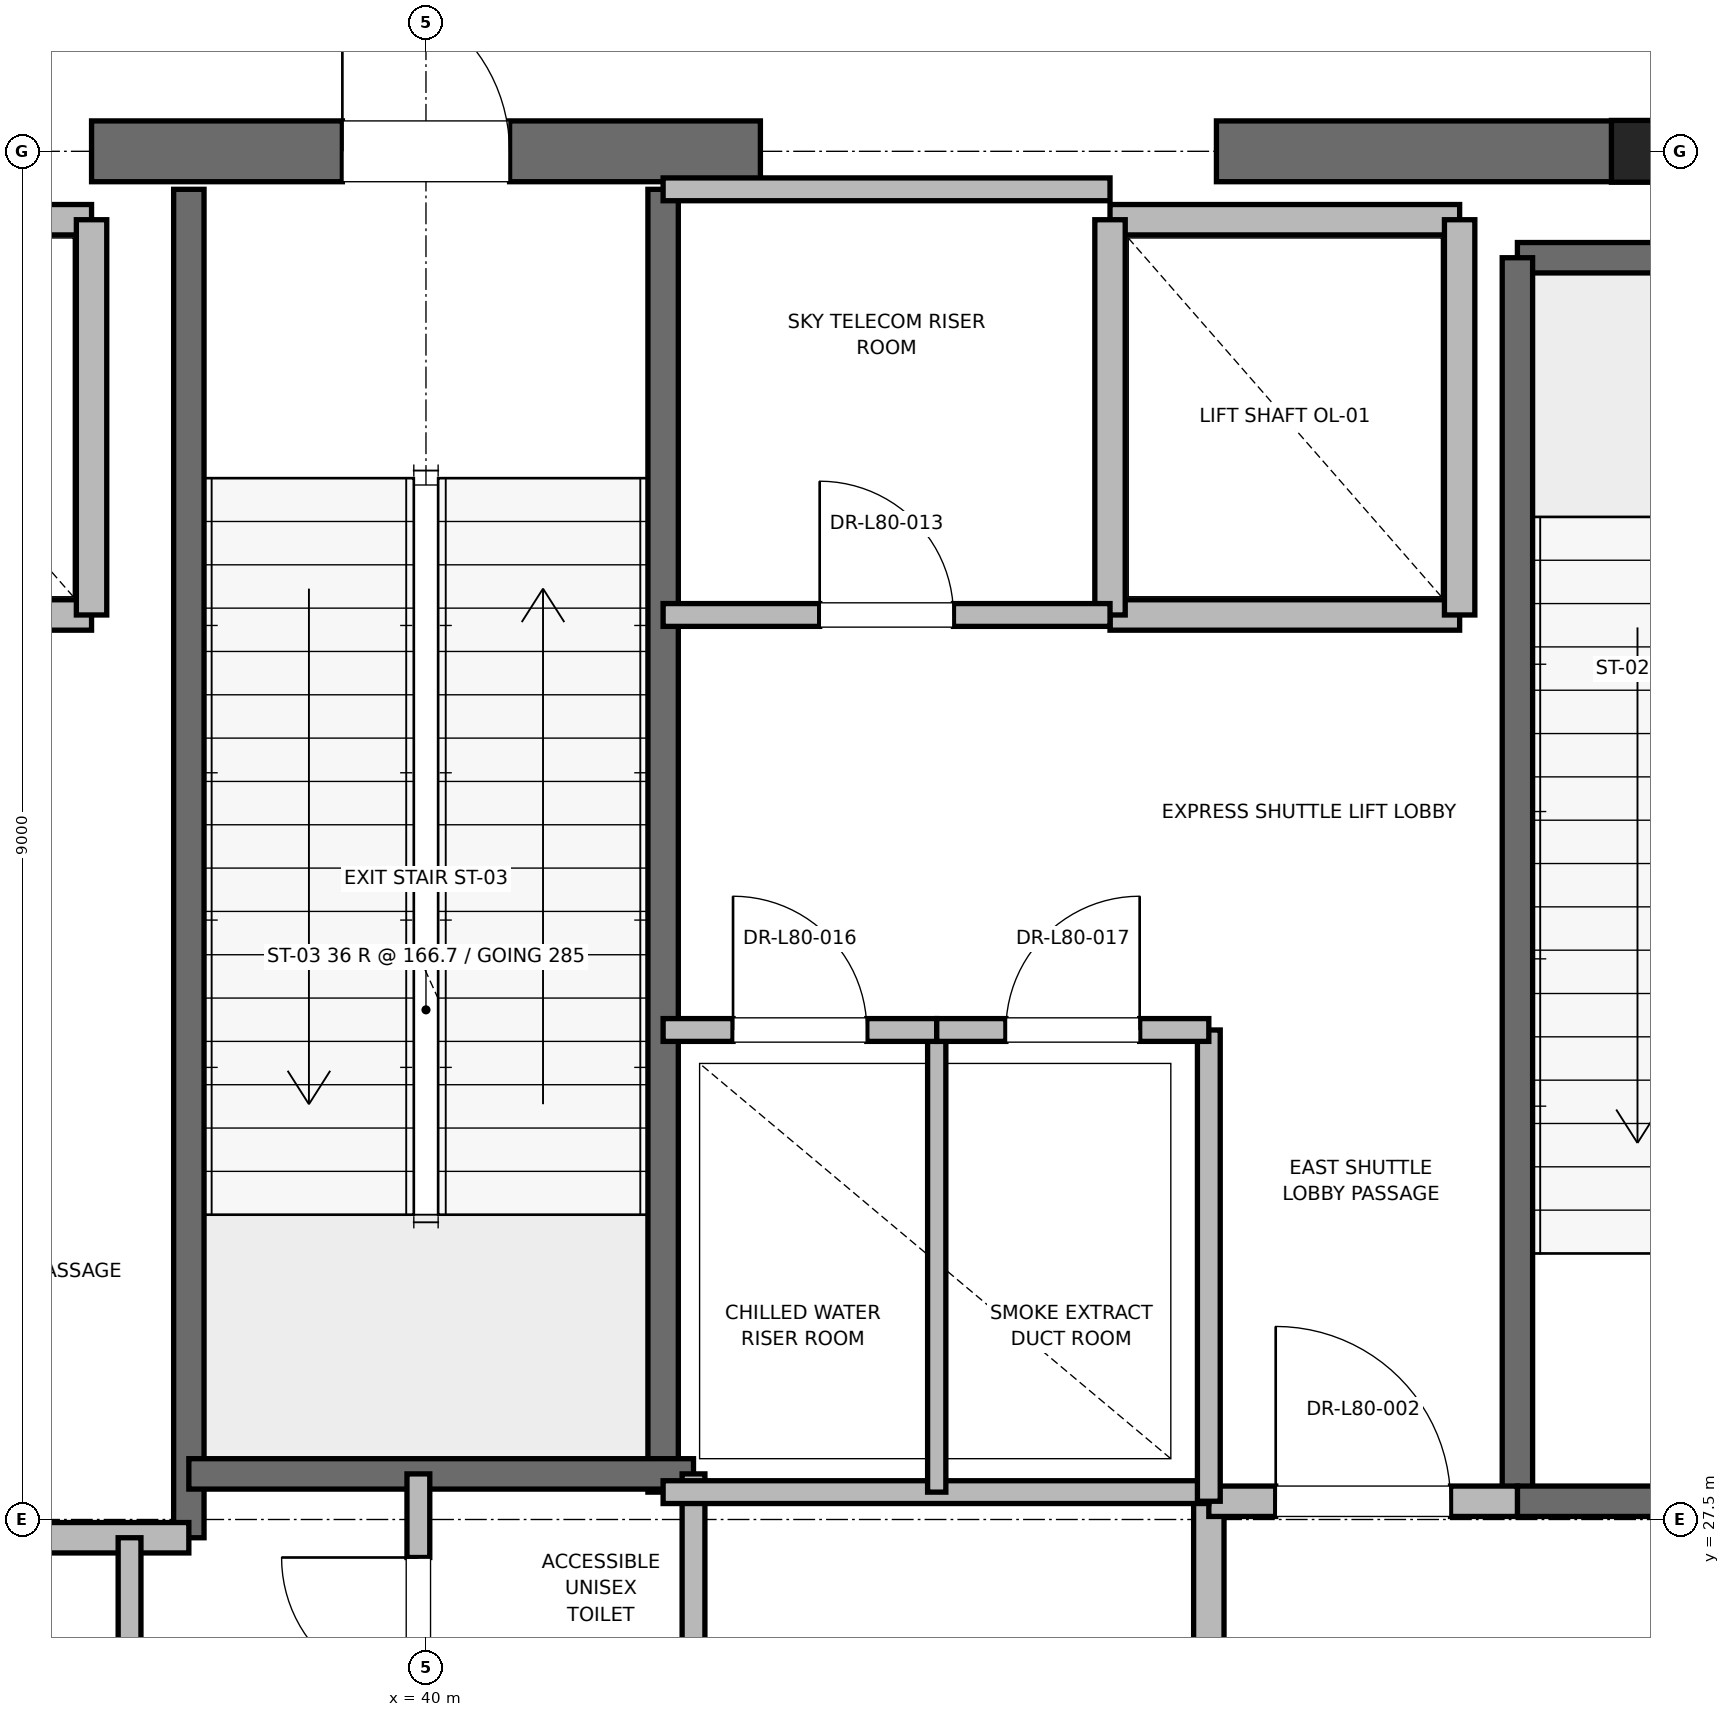
"""IFC4 building model, lengths in metres.
Left out: names, types, materials, properties, quantities, classifications, styles, units other than length and angle.
Written with IfcOpenShell. Run it as: python <this file> out.ifc"""

import sys

from ifc_helpers import new_model, si_unit, direction, frame, frame_2d, origin, origin_2d, place, context, subcontext, project, spatial, rectangle, i_section, extrude, element, fill, save


model = new_model("IFC4")
c1 = context("Model", 3, precision=1e-05, world=origin(), true_north=direction((0.0, 1.0)))
c2 = subcontext(c1, "Body", "Model", "MODEL_VIEW")
j1 = project(units=[si_unit("LENGTHUNIT", "METRE"), si_unit("PLANEANGLEUNIT", "RADIAN")], contexts=[c1])
p1 = place(None, origin())
s1 = spatial("IfcSite", under=j1, at=p1, CompositionType="ELEMENT")
p2 = place(p1, origin())
s2 = spatial("IfcBuilding", under=s1, at=p2, CompositionType="ELEMENT")
p3 = place(p2, frame((0.0, 0.0, 342.8)))
s3 = spatial("IfcBuildingStorey", under=s2, at=p3, CompositionType="ELEMENT", Elevation=342.8)
p4 = place(p3, frame((48.0, 36.5, 0.0), z_axis=(0.0, 0.0, 1.0), x_axis=(1.0, 0.0, 0.0)))
e1 = element("IfcColumn", 1, at=p4, inside=s3, PredefinedType="COLUMN", context=c2, shape_type="SweptSolid", body=[
    extrude(i_section(OverallWidth=0.403, OverallDepth=0.406, WebThickness=0.027, FlangeThickness=0.043, FilletRadius=0.015, at=origin_2d()), origin(), (0.0, 0.0, 1.0), 6.0),
])
p5 = place(p3, frame((37.8, 36.5, 0.0), z_axis=(0.0, 0.0, 1.0), x_axis=(1.0, 0.0, 0.0)))
e2 = element("IfcWall", 2, at=p5, inside=s3, PredefinedType="SHEAR", context=c2, shape_type="SweptSolid", body=[
    extrude(rectangle(XDim=4.4, YDim=0.4, at=frame_2d((2.2, 0.0))), origin(), (0.0, 0.0, 1.0), 5.7),
])
p6 = place(p5, frame((1.65, 0.0, 0.0)))
e3 = element("IfcOpeningElement", 3, at=p6, cuts=e2, PredefinedType="OPENING", context=c2, shape_type="SweptSolid", body=[
    extrude(rectangle(XDim=1.1, YDim=2.15, at=frame_2d((0.55, 1.075))), frame((0.0, 0.2, 0.0), z_axis=(0.0, -1.0, 0.0), x_axis=(1.0, 0.0, 0.0)), (0.0, 0.0, 1.0), 0.4),
])
p7 = place(p3, frame((45.2, 36.5, 0.0), z_axis=(0.0, 0.0, 1.0), x_axis=(1.0, 0.0, 0.0)))
e4 = element("IfcWall", 4, at=p7, inside=s3, PredefinedType="SHEAR", context=c2, shape_type="SweptSolid", body=[
    extrude(rectangle(XDim=5.8, YDim=0.4, at=frame_2d((2.9, 0.0))), origin(), (0.0, 0.0, 1.0), 5.7),
])
p8 = place(p3, frame((47.18, 35.8, 0.0), z_axis=(0.0, 0.0, 1.0), x_axis=(1.0, 0.0, 0.0)))
e5 = element("IfcWall", 5, at=p8, inside=s3, PredefinedType="SOLIDWALL", context=c2, shape_type="SweptSolid", body=[
    extrude(rectangle(XDim=3.12, YDim=0.2, at=frame_2d((1.56, 0.0))), origin(), (0.0, 0.0, 1.0), 5.7),
])
p9 = place(p3, frame((47.18, 27.62, 0.0), z_axis=(0.0, 0.0, 1.0), x_axis=(0.0, 1.0, 0.0)))
e6 = element("IfcWall", 6, at=p9, inside=s3, PredefinedType="SOLIDWALL", context=c2, shape_type="SweptSolid", body=[
    extrude(rectangle(XDim=8.18, YDim=0.2, at=frame_2d((4.09, 0.0))), origin(), (0.0, 0.0, 1.0), 5.7),
])
p10 = place(p3, frame((47.18, 27.62, 0.0), z_axis=(0.0, 0.0, 1.0), x_axis=(1.0, 0.0, 0.0)))
e7 = element("IfcWall", 7, at=p10, inside=s3, PredefinedType="SOLIDWALL", context=c2, shape_type="SweptSolid", body=[
    extrude(rectangle(XDim=3.12, YDim=0.2, at=frame_2d((1.56, 0.0))), origin(), (0.0, 0.0, 1.0), 5.7),
])
p11 = place(p10, frame((1.01, 0.0, 0.0)))
e8 = element("IfcOpeningElement", 8, at=p11, cuts=e7, PredefinedType="OPENING", context=c2, shape_type="SweptSolid", body=[
    extrude(rectangle(XDim=1.1, YDim=2.15, at=frame_2d((0.55, 1.075))), frame((0.0, 0.1, 0.0), z_axis=(0.0, -1.0, 0.0), x_axis=(1.0, 0.0, 0.0)), (0.0, 0.0, 1.0), 0.2),
])
p12 = place(p3, frame((38.44, 27.38, 0.0), z_axis=(0.0, 0.0, 1.0), x_axis=(0.0, 1.0, 0.0)))
e9 = element("IfcWall", 9, at=p12, inside=s3, PredefinedType="SOLIDWALL", context=c2, shape_type="SweptSolid", body=[
    extrude(rectangle(XDim=8.87, YDim=0.2, at=frame_2d((4.435, 0.0))), origin(), (0.0, 0.0, 1.0), 5.7),
])
p13 = place(p3, frame((41.56, 27.68, 0.0), z_axis=(0.0, 0.0, 1.0), x_axis=(0.0, 1.0, 0.0)))
e10 = element("IfcWall", 10, at=p13, inside=s3, PredefinedType="SOLIDWALL", context=c2, shape_type="SweptSolid", body=[
    extrude(rectangle(XDim=8.57, YDim=0.2, at=frame_2d((4.285, 0.0))), origin(), (0.0, 0.0, 1.0), 5.7),
])
p14 = place(p3, frame((38.44, 27.8, 0.0), z_axis=(0.0, 0.0, 1.0), x_axis=(1.0, 0.0, 0.0)))
e11 = element("IfcWall", 11, at=p14, inside=s3, PredefinedType="SOLIDWALL", context=c2, shape_type="SweptSolid", body=[
    extrude(rectangle(XDim=3.32, YDim=0.2, at=frame_2d((1.66, 0.0))), origin(), (0.0, 0.0, 1.0), 5.7),
])
p15 = place(p3, frame((32.82, 27.38, 0.0), z_axis=(0.0, 0.0, 1.0), x_axis=(1.0, 0.0, 0.0)))
e12 = element("IfcWall", 12, at=p15, inside=s3, PredefinedType="PARTITIONING", context=c2, shape_type="SweptSolid", body=[
    extrude(rectangle(XDim=5.62, YDim=0.2, at=frame_2d((2.81, 0.0))), origin(), (0.0, 0.0, 1.0), 5.7),
])
p16 = place(p3, frame((45.15, 24.25, 0.0), z_axis=(0.0, 0.0, 1.0), x_axis=(0.0, 1.0, 0.0)))
e13 = element("IfcWall", 13, at=p16, inside=s3, PredefinedType="PARTITIONING", context=c2, shape_type="SweptSolid", body=[
    extrude(rectangle(XDim=3.37, YDim=0.2, at=frame_2d((1.685, 0.0))), origin(), (0.0, 0.0, 1.0), 5.7),
])
p17 = place(p3, frame((45.15, 27.62, 0.0), z_axis=(0.0, 0.0, 1.0), x_axis=(1.0, 0.0, 0.0)))
e14 = element("IfcWall", 14, at=p17, inside=s3, PredefinedType="PARTITIONING", context=c2, shape_type="SweptSolid", body=[
    extrude(rectangle(XDim=2.03, YDim=0.2, at=frame_2d((1.015, 0.0))), origin(), (0.0, 0.0, 1.0), 5.7),
])
p18 = place(p17, frame((0.44, 0.0, 0.0)))
e15 = element("IfcOpeningElement", 15, at=p18, cuts=e14, PredefinedType="OPENING", context=c2, shape_type="SweptSolid", body=[
    extrude(rectangle(XDim=1.15, YDim=2.2, at=frame_2d((0.575, 1.1))), frame((0.0, 0.1, 0.0), z_axis=(0.0, -1.0, 0.0), x_axis=(1.0, 0.0, 0.0)), (0.0, 0.0, 1.0), 0.2),
])
p19 = place(p3, frame((35.5, 33.45, 0.0), z_axis=(0.0, 0.0, 1.0), x_axis=(1.0, 0.0, 0.0)))
e16 = element("IfcWall", 16, at=p19, inside=s3, PredefinedType="SOLIDWALL", context=c2, shape_type="SweptSolid", body=[
    extrude(rectangle(XDim=2.3, YDim=0.2, at=frame_2d((1.15, 0.0))), origin(), (0.0, 0.0, 1.0), 5.7),
])
p20 = place(p3, frame((37.8, 36.05, 0.0), z_axis=(0.0, 0.0, 1.0), x_axis=(-1.0, 0.0, 0.0)))
e17 = element("IfcWall", 17, at=p20, inside=s3, PredefinedType="SOLIDWALL", context=c2, shape_type="SweptSolid", body=[
    extrude(rectangle(XDim=2.3, YDim=0.2, at=frame_2d((1.15, 0.0))), origin(), (0.0, 0.0, 1.0), 4.78),
])
p21 = place(p3, frame((37.8, 33.45, 0.0), z_axis=(0.0, 0.0, 1.0), x_axis=(0.0, 1.0, 0.0)))
e18 = element("IfcWall", 18, at=p21, inside=s3, PredefinedType="SOLIDWALL", context=c2, shape_type="SweptSolid", body=[
    extrude(rectangle(XDim=2.6, YDim=0.2, at=frame_2d((1.3, 0.0))), origin(), (0.0, 0.0, 1.0), 4.78),
])
p22 = place(p3, frame((44.5, 33.45, 0.0), z_axis=(0.0, 0.0, 1.0), x_axis=(1.0, 0.0, 0.0)))
e19 = element("IfcWall", 19, at=p22, inside=s3, PredefinedType="SOLIDWALL", context=c2, shape_type="SweptSolid", body=[
    extrude(rectangle(XDim=2.3, YDim=0.2, at=frame_2d((1.15, 0.0))), origin(), (0.0, 0.0, 1.0), 5.7),
])
p23 = place(p3, frame((46.8, 36.05, 0.0), z_axis=(0.0, 0.0, 1.0), x_axis=(-1.0, 0.0, 0.0)))
e20 = element("IfcWall", 20, at=p23, inside=s3, PredefinedType="SOLIDWALL", context=c2, shape_type="SweptSolid", body=[
    extrude(rectangle(XDim=2.3, YDim=0.2, at=frame_2d((1.15, 0.0))), origin(), (0.0, 0.0, 1.0), 4.78),
])
p24 = place(p3, frame((44.5, 36.05, 0.0), z_axis=(0.0, 0.0, 1.0), x_axis=(0.0, -1.0, 0.0)))
e21 = element("IfcWall", 21, at=p24, inside=s3, PredefinedType="SOLIDWALL", context=c2, shape_type="SweptSolid", body=[
    extrude(rectangle(XDim=2.6, YDim=0.2, at=frame_2d((1.3, 0.0))), origin(), (0.0, 0.0, 1.0), 4.78),
])
p25 = place(p3, frame((46.8, 33.45, 0.0), z_axis=(0.0, 0.0, 1.0), x_axis=(0.0, 1.0, 0.0)))
e22 = element("IfcWall", 22, at=p25, inside=s3, PredefinedType="SOLIDWALL", context=c2, shape_type="SweptSolid", body=[
    extrude(rectangle(XDim=2.6, YDim=0.2, at=frame_2d((1.3, 0.0))), origin(), (0.0, 0.0, 1.0), 5.7),
])
p26 = place(p3, frame((41.76, 23.8, 0.0), z_axis=(0.0, 0.0, 1.0), x_axis=(0.0, 1.0, 0.0)))
e23 = element("IfcWall", 23, at=p26, inside=s3, PredefinedType="PARTITIONING", context=c2, shape_type="SweptSolid", body=[
    extrude(rectangle(XDim=4.0, YDim=0.15, at=frame_2d((2.0, 0.0))), origin(), (0.0, 0.0, 1.0), 2.85),
])
p27 = place(p3, frame((39.95, 25.8, 0.0), z_axis=(0.0, 0.0, 1.0), x_axis=(0.0, 1.0, 0.0)))
e24 = element("IfcWall", 24, at=p27, inside=s3, PredefinedType="PARTITIONING", context=c2, shape_type="SweptSolid", body=[
    extrude(rectangle(XDim=2.0, YDim=0.15, at=frame_2d((1.0, 0.0))), origin(), (0.0, 0.0, 1.0), 2.85),
])
p28 = place(p27, frame((0.55, 0.0, 0.0)))
e25 = element("IfcOpeningElement", 25, at=p28, cuts=e24, PredefinedType="OPENING", context=c2, shape_type="SweptSolid", body=[
    extrude(rectangle(XDim=0.9, YDim=2.1, at=frame_2d((0.45, 1.05))), frame((0.0, 0.075, 0.0), z_axis=(0.0, -1.0, 0.0), x_axis=(1.0, 0.0, 0.0)), (0.0, 0.0, 1.0), 0.15),
])
p29 = place(p3, frame((38.05, 23.06, 0.0), z_axis=(0.0, 0.0, 1.0), x_axis=(0.0, 1.0, 0.0)))
e26 = element("IfcWall", 26, at=p29, inside=s3, PredefinedType="PARTITIONING", context=c2, shape_type="SweptSolid", body=[
    extrude(rectangle(XDim=4.32, YDim=0.15, at=frame_2d((2.16, 0.0))), origin(), (0.0, 0.0, 1.0), 2.85),
])
p30 = place(p29, frame((1.72, 0.0, 0.0)))
e27 = element("IfcOpeningElement", 27, at=p30, cuts=e26, PredefinedType="OPENING", context=c2, shape_type="SweptSolid", body=[
    extrude(rectangle(XDim=0.88, YDim=2.1, at=frame_2d((0.44, 1.05))), frame((0.0, 0.075, 0.0), z_axis=(0.0, -1.0, 0.0), x_axis=(1.0, 0.0, 0.0)), (0.0, 0.0, 1.0), 0.15),
])
p31 = place(p3, frame((41.56, 27.68, 0.0), z_axis=(0.0, 0.0, 1.0), x_axis=(1.0, 0.0, 0.0)))
e28 = element("IfcWall", 28, at=p31, inside=s3, PredefinedType="PARTITIONING", context=c2, shape_type="SweptSolid", body=[
    extrude(rectangle(XDim=3.59, YDim=0.15, at=frame_2d((1.795, 0.0))), origin(), (0.0, 0.0, 1.0), 2.85),
])
p32 = place(p3, frame((45.15, 27.62, 0.0), z_axis=(0.0, 0.0, 1.0), x_axis=(0.0, 1.0, 0.0)))
e29 = element("IfcWall", 29, at=p32, inside=s3, PredefinedType="PARTITIONING", context=c2, shape_type="SweptSolid", body=[
    extrude(rectangle(XDim=3.1, YDim=0.15, at=frame_2d((1.55, 0.0))), origin(), (0.0, 0.0, 1.0), 2.85),
])
p33 = place(p3, frame((43.36, 27.68, 0.0), z_axis=(0.0, 0.0, 1.0), x_axis=(0.0, 1.0, 0.0)))
e30 = element("IfcWall", 30, at=p33, inside=s3, PredefinedType="PARTITIONING", context=c2, shape_type="SweptSolid", body=[
    extrude(rectangle(XDim=3.04, YDim=0.12, at=frame_2d((1.52, 0.0))), origin(), (0.0, 0.0, 1.0), 2.85),
])
p34 = place(p3, frame((41.56, 30.72, 0.0), z_axis=(0.0, 0.0, 1.0), x_axis=(1.0, 0.0, 0.0)))
e31 = element("IfcWall", 31, at=p34, inside=s3, PredefinedType="PARTITIONING", context=c2, shape_type="SweptSolid", body=[
    extrude(rectangle(XDim=1.8, YDim=0.15, at=frame_2d((0.9, 0.0))), origin(), (0.0, 0.0, 1.0), 2.85),
])
p35 = place(p34, frame((0.46, 0.0, 0.0)))
e32 = element("IfcOpeningElement", 32, at=p35, cuts=e31, PredefinedType="OPENING", context=c2, shape_type="SweptSolid", body=[
    extrude(rectangle(XDim=0.88, YDim=2.1, at=frame_2d((0.44, 1.05))), frame((0.0, 0.075, 0.0), z_axis=(0.0, -1.0, 0.0), x_axis=(1.0, 0.0, 0.0)), (0.0, 0.0, 1.0), 0.15),
])
p36 = place(p3, frame((43.36, 30.72, 0.0), z_axis=(0.0, 0.0, 1.0), x_axis=(1.0, 0.0, 0.0)))
e33 = element("IfcWall", 33, at=p36, inside=s3, PredefinedType="PARTITIONING", context=c2, shape_type="SweptSolid", body=[
    extrude(rectangle(XDim=1.79, YDim=0.15, at=frame_2d((0.895, 0.0))), origin(), (0.0, 0.0, 1.0), 2.85),
])
p37 = place(p36, frame((0.455, 0.0, 0.0)))
e34 = element("IfcOpeningElement", 34, at=p37, cuts=e33, PredefinedType="OPENING", context=c2, shape_type="SweptSolid", body=[
    extrude(rectangle(XDim=0.88, YDim=2.1, at=frame_2d((0.44, 1.05))), frame((0.0, 0.075, 0.0), z_axis=(0.0, -1.0, 0.0), x_axis=(1.0, 0.0, 0.0)), (0.0, 0.0, 1.0), 0.15),
])
p38 = place(p3, frame((41.56, 36.25, 0.0), z_axis=(0.0, 0.0, 1.0), x_axis=(1.0, 0.0, 0.0)))
e35 = element("IfcWall", 35, at=p38, inside=s3, PredefinedType="PARTITIONING", context=c2, shape_type="SweptSolid", body=[
    extrude(rectangle(XDim=2.94, YDim=0.15, at=frame_2d((1.47, 0.0))), origin(), (0.0, 0.0, 1.0), 2.85),
])
p39 = place(p3, frame((41.56, 33.45, 0.0), z_axis=(0.0, 0.0, 1.0), x_axis=(1.0, 0.0, 0.0)))
e36 = element("IfcWall", 36, at=p39, inside=s3, PredefinedType="PARTITIONING", context=c2, shape_type="SweptSolid", body=[
    extrude(rectangle(XDim=2.94, YDim=0.15, at=frame_2d((1.47, 0.0))), origin(), (0.0, 0.0, 1.0), 2.85),
])
p40 = place(p39, frame((1.03, 0.0, 0.0)))
e37 = element("IfcOpeningElement", 37, at=p40, cuts=e36, PredefinedType="OPENING", context=c2, shape_type="SweptSolid", body=[
    extrude(rectangle(XDim=0.88, YDim=2.1, at=frame_2d((0.44, 1.05))), frame((0.0, 0.075, 0.0), z_axis=(0.0, -1.0, 0.0), x_axis=(1.0, 0.0, 0.0)), (0.0, 0.0, 1.0), 0.15),
])
p41 = place(p6, origin())
e38 = element("IfcDoor", 38, at=p41, inside=s3, OperationType="SINGLE_SWING_LEFT", PredefinedType="DOOR", context=c2, shape_type="SweptSolid", body=[
    extrude(rectangle(XDim=1.1, YDim=2.15, at=frame_2d((0.55, 1.075))), frame((0.0, 0.025, 0.0), z_axis=(0.0, -1.0, 0.0), x_axis=(1.0, 0.0, 0.0)), (0.0, 0.0, 1.0), 0.05),
])
fill(e3, e38)
p42 = place(p18, origin())
e39 = element("IfcDoor", 39, at=p42, inside=s3, OperationType="SINGLE_SWING_LEFT", PredefinedType="DOOR", context=c2, shape_type="SweptSolid", body=[
    extrude(rectangle(XDim=1.15, YDim=2.2, at=frame_2d((0.575, 1.1))), frame((0.0, 0.025, 0.0), z_axis=(0.0, -1.0, 0.0), x_axis=(1.0, 0.0, 0.0)), (0.0, 0.0, 1.0), 0.05),
])
fill(e15, e39)
p43 = place(p28, origin())
e40 = element("IfcDoor", 40, at=p43, inside=s3, OperationType="SINGLE_SWING_RIGHT", PredefinedType="DOOR", context=c2, shape_type="SweptSolid", body=[
    extrude(rectangle(XDim=0.9, YDim=2.1, at=frame_2d((0.45, 1.05))), frame((0.0, 0.025, 0.0), z_axis=(0.0, -1.0, 0.0), x_axis=(1.0, 0.0, 0.0)), (0.0, 0.0, 1.0), 0.05),
])
fill(e25, e40)
p44 = place(p35, origin())
e41 = element("IfcDoor", 41, at=p44, inside=s3, OperationType="SINGLE_SWING_LEFT", PredefinedType="DOOR", context=c2, shape_type="SweptSolid", body=[
    extrude(rectangle(XDim=0.88, YDim=2.1, at=frame_2d((0.44, 1.05))), frame((0.0, 0.025, 0.0), z_axis=(0.0, -1.0, 0.0), x_axis=(1.0, 0.0, 0.0)), (0.0, 0.0, 1.0), 0.05),
])
fill(e32, e41)
p45 = place(p37, origin())
e42 = element("IfcDoor", 42, at=p45, inside=s3, OperationType="SINGLE_SWING_RIGHT", PredefinedType="DOOR", context=c2, shape_type="SweptSolid", body=[
    extrude(rectangle(XDim=0.88, YDim=2.1, at=frame_2d((0.44, 1.05))), frame((0.0, 0.025, 0.0), z_axis=(0.0, -1.0, 0.0), x_axis=(1.0, 0.0, 0.0)), (0.0, 0.0, 1.0), 0.05),
])
fill(e34, e42)
p46 = place(p40, origin())
e43 = element("IfcDoor", 43, at=p46, inside=s3, OperationType="SINGLE_SWING_LEFT", PredefinedType="DOOR", context=c2, shape_type="SweptSolid", body=[
    extrude(rectangle(XDim=0.88, YDim=2.1, at=frame_2d((0.44, 1.05))), frame((0.0, 0.025, 0.0), z_axis=(0.0, -1.0, 0.0), x_axis=(1.0, 0.0, 0.0)), (0.0, 0.0, 1.0), 0.05),
])
fill(e37, e43)
save(model, sys.argv[1])
